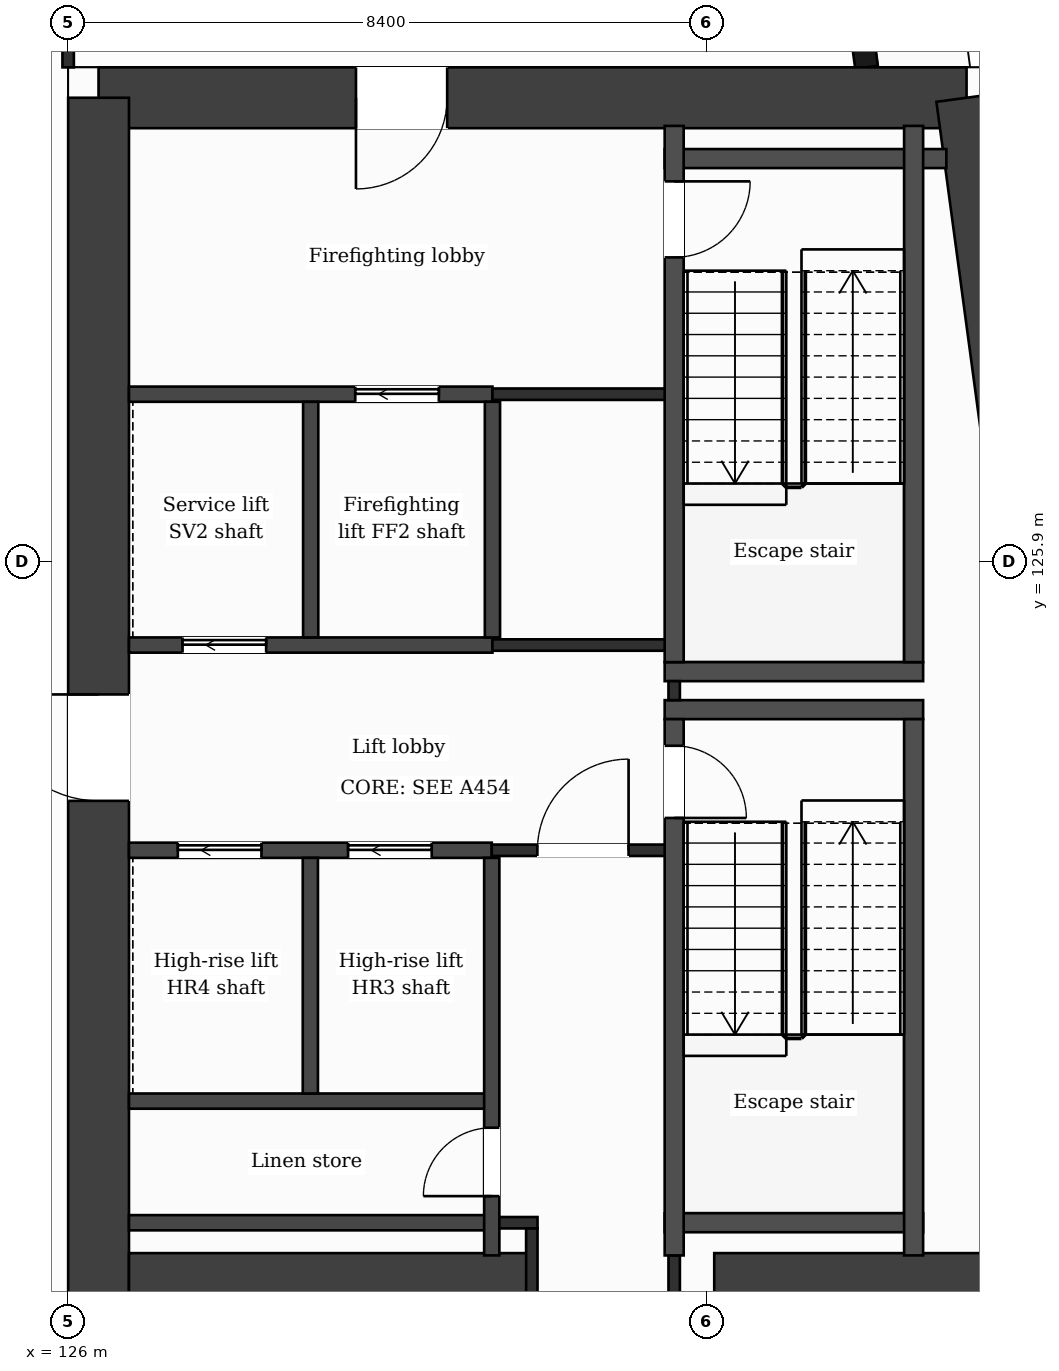
"""IFC4 building model, lengths in metres.
Left out: names, types, materials, properties, quantities, classifications, styles, units other than length and angle.
Written with IfcOpenShell. Run it as: python <this file> out.ifc"""

import sys

from ifc_helpers import new_model, si_unit, direction, frame, frame_2d, origin, place, context, subcontext, project, spatial, rectangle, extrude, element, fill, save


model = new_model("IFC4")
c1 = context("Model", 3, precision=1e-05, world=origin(), true_north=direction((0.0, 1.0)))
c2 = subcontext(c1, "Body", "Model", "MODEL_VIEW")
j1 = project(units=[si_unit("LENGTHUNIT", "METRE"), si_unit("PLANEANGLEUNIT", "RADIAN")], contexts=[c1])
p1 = place(None, origin())
s1 = spatial("IfcSite", under=j1, at=p1, CompositionType="ELEMENT")
p2 = place(p1, origin())
s2 = spatial("IfcBuilding", under=s1, at=p2, CompositionType="ELEMENT")
p3 = place(p2, frame((0.0, 0.0, 220.7)))
s3 = spatial("IfcBuildingStorey", under=s2, at=p3, CompositionType="ELEMENT", Elevation=220.7)
p4 = place(p3, frame((126.4, 132.0, 0.0), z_axis=(0.0, 0.0, 1.0), x_axis=(1.0, 0.0, 0.0)))
e1 = element("IfcWall", 1, at=p4, inside=s3, PredefinedType="SHEAR", context=c2, shape_type="SweptSolid", body=[
    extrude(rectangle(XDim=11.42, YDim=0.8, at=frame_2d((5.71, 0.0))), origin(), (0.0, 0.0, 1.0), 3.7),
])
p5 = place(p4, frame((3.386, 0.0, 0.0)))
e2 = element("IfcOpeningElement", 2, at=p5, cuts=e1, PredefinedType="OPENING", context=c2, shape_type="SweptSolid", body=[
    extrude(rectangle(XDim=1.2, YDim=2.1, at=frame_2d((0.6, 1.05))), frame((0.0, 0.41, 0.0), z_axis=(0.0, -1.0, 0.0), x_axis=(1.0, 0.0, 0.0)), (0.0, 0.0, 1.0), 0.82),
])
p6 = place(p3, frame((137.82, 132.0, 0.0), z_axis=(0.0, 0.0, 1.0), x_axis=(0.133408347329, -0.991061154956, 0.0)))
e3 = element("IfcWall", 3, at=p6, inside=s3, PredefinedType="SHEAR", context=c2, shape_type="SweptSolid", body=[
    extrude(rectangle(XDim=21.391, YDim=0.8, at=frame_2d((10.696, 0.0))), origin(), (0.0, 0.0, 1.0), 3.7),
])
p7 = place(p3, frame((126.4, 110.8, 0.0), z_axis=(0.0, 0.0, 1.0), x_axis=(0.0, 1.0, 0.0)))
e4 = element("IfcWall", 4, at=p7, inside=s3, PredefinedType="SHEAR", context=c2, shape_type="SweptSolid", body=[
    extrude(rectangle(XDim=21.2, YDim=0.8, at=frame_2d((10.6, 0.0))), origin(), (0.0, 0.0, 1.0), 3.7),
])
p8 = place(p7, frame((11.95, 0.0, 0.0)))
e5 = element("IfcOpeningElement", 5, at=p8, cuts=e4, PredefinedType="OPENING", context=c2, shape_type="SweptSolid", body=[
    extrude(rectangle(XDim=1.4, YDim=2.1, at=frame_2d((0.7, 1.05))), frame((0.0, 0.41, 0.0), z_axis=(0.0, -1.0, 0.0), x_axis=(1.0, 0.0, 0.0)), (0.0, 0.0, 1.0), 0.82),
])
p9 = place(p3, frame((126.8, 116.4, 0.0), z_axis=(0.0, 0.0, 1.0), x_axis=(1.0, 0.0, 0.0)))
e6 = element("IfcWall", 6, at=p9, inside=s3, PredefinedType="SHEAR", context=c2, shape_type="SweptSolid", body=[
    extrude(rectangle(XDim=5.3, YDim=0.8, at=frame_2d((2.65, 0.0))), origin(), (0.0, 0.0, 1.0), 3.7),
])
p10 = place(p3, frame((134.5, 116.4, 0.0), z_axis=(0.0, 0.0, 1.0), x_axis=(1.0, 0.0, 0.0)))
e7 = element("IfcWall", 7, at=p10, inside=s3, PredefinedType="SHEAR", context=c2, shape_type="SweptSolid", body=[
    extrude(rectangle(XDim=5.077, YDim=0.8, at=frame_2d((2.539, 0.0))), origin(), (0.0, 0.0, 1.0), 3.7),
])
p11 = place(p3, frame((136.504, 132.4, 0.0), z_axis=(0.0, 0.0, 1.0), x_axis=(-0.133399697462, 0.99106231929, 0.0)))
e8 = element("IfcWall", 8, at=p11, inside=s3, PredefinedType="SOLIDWALL", context=c2, shape_type="SweptSolid", body=[
    extrude(rectangle(XDim=6.74, YDim=0.3, at=frame_2d((3.37, 0.0))), origin(), (0.0, 0.0, 1.0), 3.38),
])
p12 = place(p11, frame((1.115, 0.0, 0.0)))
e9 = element("IfcOpeningElement", 9, at=p12, cuts=e8, PredefinedType="OPENING", context=c2, shape_type="SweptSolid", body=[
    extrude(rectangle(XDim=1.2, YDim=2.4, at=frame_2d((0.6, 1.2))), frame((0.0, 0.16, 0.0), z_axis=(0.0, -1.0, 0.0), x_axis=(1.0, 0.0, 0.0)), (0.0, 0.0, 1.0), 0.32),
])
p13 = place(p11, frame((4.436, 0.0, 0.9)))
e10 = element("IfcOpeningElement", 10, at=p13, cuts=e8, PredefinedType="OPENING", context=c2, shape_type="SweptSolid", body=[
    extrude(rectangle(XDim=1.2, YDim=2.1, at=frame_2d((0.6, 1.05))), frame((0.0, 0.16, 0.0), z_axis=(0.0, -1.0, 0.0), x_axis=(1.0, 0.0, 0.0)), (0.0, 0.0, 1.0), 0.32),
])
p14 = place(p3, frame((126.8, 117.2, 0.0), z_axis=(0.0, 0.0, 1.0), x_axis=(1.0, 0.0, 0.0)))
e11 = element("IfcWall", 11, at=p14, inside=s3, PredefinedType="PARTITIONING", context=c2, shape_type="SweptSolid", body=[
    extrude(rectangle(XDim=4.773, YDim=0.2, at=frame_2d((2.386, 0.0))), origin(), (0.0, 0.0, 1.0), 3.38),
])
p15 = place(p3, frame((131.573, 117.2, 0.0), z_axis=(0.0, 0.0, 1.0), x_axis=(1.0, 0.0, 0.0)))
e12 = element("IfcWall", 12, at=p15, inside=s3, PredefinedType="PARTITIONING", context=c2, shape_type="SweptSolid", body=[
    extrude(rectangle(XDim=0.602, YDim=0.15, at=frame_2d((0.301, 0.0))), origin(), (0.0, 0.0, 1.0), 3.38),
])
p16 = place(p3, frame((133.848, 117.2, 0.0), z_axis=(0.0, 0.0, 1.0), x_axis=(1.0, 0.0, 0.0)))
e13 = element("IfcWall", 13, at=p16, inside=s3, PredefinedType="PARTITIONING", context=c2, shape_type="SweptSolid", body=[
    extrude(rectangle(XDim=3.4, YDim=0.25, at=frame_2d((1.7, 0.0))), origin(), (0.0, 0.0, 1.0), 3.38),
])
p17 = place(p3, frame((126.8, 118.8, 0.0), z_axis=(0.0, 0.0, 1.0), x_axis=(1.0, 0.0, 0.0)))
e14 = element("IfcWall", 14, at=p17, inside=s3, PredefinedType="PARTITIONING", context=c2, shape_type="SweptSolid", body=[
    extrude(rectangle(XDim=4.773, YDim=0.2, at=frame_2d((2.386, 0.0))), origin(), (0.0, 0.0, 1.0), 3.38),
])
p18 = place(p3, frame((126.8, 122.1, 0.0), z_axis=(0.0, 0.0, 1.0), x_axis=(1.0, 0.0, 0.0)))
e15 = element("IfcWall", 15, at=p18, inside=s3, PredefinedType="PARTITIONING", context=c2, shape_type="SweptSolid", body=[
    extrude(rectangle(XDim=4.773, YDim=0.2, at=frame_2d((2.386, 0.0))), origin(), (0.0, 0.0, 1.0), 3.38),
])
p19 = place(p18, frame((2.883, 0.0, 0.0)))
e16 = element("IfcOpeningElement", 16, at=p19, cuts=e15, PredefinedType="OPENING", context=c2, shape_type="SweptSolid", body=[
    extrude(rectangle(XDim=1.1, YDim=2.1, at=frame_2d((0.55, 1.05))), frame((0.0, 0.11, 0.0), z_axis=(0.0, -1.0, 0.0), x_axis=(1.0, 0.0, 0.0)), (0.0, 0.0, 1.0), 0.22),
])
p20 = place(p18, frame((0.643, 0.0, 0.0)))
e17 = element("IfcOpeningElement", 17, at=p20, cuts=e15, PredefinedType="OPENING", context=c2, shape_type="SweptSolid", body=[
    extrude(rectangle(XDim=1.1, YDim=2.1, at=frame_2d((0.55, 1.05))), frame((0.0, 0.11, 0.0), z_axis=(0.0, -1.0, 0.0), x_axis=(1.0, 0.0, 0.0)), (0.0, 0.0, 1.0), 0.22),
])
p21 = place(p3, frame((131.573, 122.1, 0.0), z_axis=(0.0, 0.0, 1.0), x_axis=(1.0, 0.0, 0.0)))
e18 = element("IfcWall", 18, at=p21, inside=s3, PredefinedType="PARTITIONING", context=c2, shape_type="SweptSolid", body=[
    extrude(rectangle(XDim=2.4, YDim=0.15, at=frame_2d((1.2, 0.0))), origin(), (0.0, 0.0, 1.0), 3.38),
])
p22 = place(p21, frame((0.6, 0.0, 0.0)))
e19 = element("IfcOpeningElement", 19, at=p22, cuts=e18, PredefinedType="OPENING", context=c2, shape_type="SweptSolid", body=[
    extrude(rectangle(XDim=1.2, YDim=2.1, at=frame_2d((0.6, 1.05))), frame((0.0, 0.085, 0.0), z_axis=(0.0, -1.0, 0.0), x_axis=(1.0, 0.0, 0.0)), (0.0, 0.0, 1.0), 0.17),
])
for number, where, z_axis, x_axis in (
    (20, (133.848, 123.95, 0.0), (0.0, 0.0, 1.0), (1.0, 0.0, 0.0)),
    (21, (133.848, 124.45, 0.0), (0.0, 0.0, 1.0), (1.0, 0.0, 0.0)),
):
    element("IfcWall", number, at=place(p3, frame(where, z_axis=z_axis, x_axis=x_axis)), inside=s3, PredefinedType="PARTITIONING", context=c2, shape_type="SweptSolid", body=[
        extrude(rectangle(XDim=3.4, YDim=0.25, at=frame_2d((1.7, 0.0))), origin(), (0.0, 0.0, 1.0), 3.38),
    ])
p23 = place(p3, frame((126.8, 124.8, 0.0), z_axis=(0.0, 0.0, 1.0), x_axis=(1.0, 0.0, 0.0)))
e22 = element("IfcWall", 22, at=p23, inside=s3, PredefinedType="PARTITIONING", context=c2, shape_type="SweptSolid", body=[
    extrude(rectangle(XDim=4.782, YDim=0.2, at=frame_2d((2.391, 0.0))), origin(), (0.0, 0.0, 1.0), 3.38),
])
p24 = place(p23, frame((0.705, 0.0, 0.0)))
e23 = element("IfcOpeningElement", 23, at=p24, cuts=e22, PredefinedType="OPENING", context=c2, shape_type="SweptSolid", body=[
    extrude(rectangle(XDim=1.1, YDim=2.1, at=frame_2d((0.55, 1.05))), frame((0.0, 0.11, 0.0), z_axis=(0.0, -1.0, 0.0), x_axis=(1.0, 0.0, 0.0)), (0.0, 0.0, 1.0), 0.22),
])
p25 = place(p3, frame((131.582, 124.8, 0.0), z_axis=(0.0, 0.0, 1.0), x_axis=(1.0, 0.0, 0.0)))
e24 = element("IfcWall", 24, at=p25, inside=s3, PredefinedType="PARTITIONING", context=c2, shape_type="SweptSolid", body=[
    extrude(rectangle(XDim=2.516, YDim=0.15, at=frame_2d((1.258, 0.0))), origin(), (0.0, 0.0, 1.0), 3.38),
])
p26 = place(p3, frame((126.8, 128.1, 0.0), z_axis=(0.0, 0.0, 1.0), x_axis=(1.0, 0.0, 0.0)))
e25 = element("IfcWall", 25, at=p26, inside=s3, PredefinedType="PARTITIONING", context=c2, shape_type="SweptSolid", body=[
    extrude(rectangle(XDim=4.782, YDim=0.2, at=frame_2d((2.391, 0.0))), origin(), (0.0, 0.0, 1.0), 3.38),
])
p27 = place(p26, frame((2.977, 0.0, 0.0)))
e26 = element("IfcOpeningElement", 26, at=p27, cuts=e25, PredefinedType="OPENING", context=c2, shape_type="SweptSolid", body=[
    extrude(rectangle(XDim=1.1, YDim=2.1, at=frame_2d((0.55, 1.05))), frame((0.0, 0.11, 0.0), z_axis=(0.0, -1.0, 0.0), x_axis=(1.0, 0.0, 0.0)), (0.0, 0.0, 1.0), 0.22),
])
p28 = place(p3, frame((131.582, 128.1, 0.0), z_axis=(0.0, 0.0, 1.0), x_axis=(1.0, 0.0, 0.0)))
e27 = element("IfcWall", 27, at=p28, inside=s3, PredefinedType="PARTITIONING", context=c2, shape_type="SweptSolid", body=[
    extrude(rectangle(XDim=2.391, YDim=0.15, at=frame_2d((1.195, 0.0))), origin(), (0.0, 0.0, 1.0), 3.38),
])
p29 = place(p3, frame((133.848, 131.2, 0.0), z_axis=(0.0, 0.0, 1.0), x_axis=(1.0, 0.0, 0.0)))
e28 = element("IfcWall", 28, at=p29, inside=s3, PredefinedType="PARTITIONING", context=c2, shape_type="SweptSolid", body=[
    extrude(rectangle(XDim=3.706, YDim=0.25, at=frame_2d((1.853, 0.0))), origin(), (0.0, 0.0, 1.0), 3.38),
])
p30 = place(p3, frame((126.0, 132.4, 0.0), z_axis=(0.0, 0.0, 1.0), x_axis=(0.0, 1.0, 0.0)))
e29 = element("IfcWall", 29, at=p30, inside=s3, PredefinedType="PARTITIONING", context=c2, shape_type="SweptSolid", body=[
    extrude(rectangle(XDim=1.325, YDim=0.15, at=frame_2d((0.663, 0.0))), origin(), (0.0, 0.0, 1.0), 3.38),
])
for number, where, z_axis, x_axis in (
    (30, (129.187, 118.9, 0.0), (0.0, 0.0, 1.0), (0.0, 1.0, 0.0)),
    (31, (129.191, 124.9, 0.0), (0.0, 0.0, 1.0), (0.0, 1.0, 0.0)),
):
    element("IfcWall", number, at=place(p3, frame(where, z_axis=z_axis, x_axis=x_axis)), inside=s3, PredefinedType="PARTITIONING", context=c2, shape_type="SweptSolid", body=[
        extrude(rectangle(XDim=3.1, YDim=0.2, at=frame_2d((1.55, 0.0))), origin(), (0.0, 0.0, 1.0), 3.38),
    ])
p31 = place(p3, frame((131.573, 116.77, 0.0), z_axis=(0.0, 0.0, 1.0), x_axis=(0.0, 1.0, 0.0)))
e32 = element("IfcWall", 32, at=p31, inside=s3, PredefinedType="PARTITIONING", context=c2, shape_type="SweptSolid", body=[
    extrude(rectangle(XDim=5.23, YDim=0.2, at=frame_2d((2.615, 0.0))), origin(), (0.0, 0.0, 1.0), 3.38),
])
p32 = place(p31, frame((0.78, 0.0, 0.0)))
e33 = element("IfcOpeningElement", 33, at=p32, cuts=e32, PredefinedType="OPENING", context=c2, shape_type="SweptSolid", body=[
    extrude(rectangle(XDim=0.9, YDim=2.1, at=frame_2d((0.45, 1.05))), frame((0.0, 0.11, 0.0), z_axis=(0.0, -1.0, 0.0), x_axis=(1.0, 0.0, 0.0)), (0.0, 0.0, 1.0), 0.22),
])
p33 = place(p3, frame((131.582, 124.9, 0.0), z_axis=(0.0, 0.0, 1.0), x_axis=(0.0, 1.0, 0.0)))
e34 = element("IfcWall", 34, at=p33, inside=s3, PredefinedType="PARTITIONING", context=c2, shape_type="SweptSolid", body=[
    extrude(rectangle(XDim=3.1, YDim=0.2, at=frame_2d((1.55, 0.0))), origin(), (0.0, 0.0, 1.0), 3.38),
])
p34 = place(p3, frame((132.1, 116.0, 0.0), z_axis=(0.0, 0.0, 1.0), x_axis=(0.0, 1.0, 0.0)))
e35 = element("IfcWall", 35, at=p34, inside=s3, PredefinedType="PARTITIONING", context=c2, shape_type="SweptSolid", body=[
    extrude(rectangle(XDim=1.125, YDim=0.15, at=frame_2d((0.562, 0.0))), origin(), (0.0, 0.0, 1.0), 3.38),
])
p35 = place(p3, frame((133.973, 116.0, 0.0), z_axis=(0.0, 0.0, 1.0), x_axis=(0.0, 1.0, 0.0)))
e36 = element("IfcWall", 36, at=p35, inside=s3, PredefinedType="PARTITIONING", context=c2, shape_type="SweptSolid", body=[
    extrude(rectangle(XDim=0.77, YDim=0.15, at=frame_2d((0.385, 0.0))), origin(), (0.0, 0.0, 1.0), 3.38),
])
p36 = place(p3, frame((133.973, 124.075, 0.0), z_axis=(0.0, 0.0, 1.0), x_axis=(0.0, 1.0, 0.0)))
e37 = element("IfcWall", 37, at=p36, inside=s3, PredefinedType="PARTITIONING", context=c2, shape_type="SweptSolid", body=[
    extrude(rectangle(XDim=0.25, YDim=0.15, at=frame_2d((0.125, 0.0))), origin(), (0.0, 0.0, 1.0), 3.38),
])
p37 = place(p3, frame((133.973, 116.77, 0.0), z_axis=(0.0, 0.0, 1.0), x_axis=(0.0, 1.0, 0.0)))
e38 = element("IfcWall", 38, at=p37, inside=s3, PredefinedType="PARTITIONING", context=c2, shape_type="SweptSolid", body=[
    extrude(rectangle(XDim=7.055, YDim=0.25, at=frame_2d((3.527, 0.0))), origin(), (0.0, 0.0, 1.0), 3.38),
])
p38 = place(p37, frame((5.755, 0.0, 0.0)))
e39 = element("IfcOpeningElement", 39, at=p38, cuts=e38, PredefinedType="OPENING", context=c2, shape_type="SweptSolid", body=[
    extrude(rectangle(XDim=0.95, YDim=2.1, at=frame_2d((0.475, 1.05))), frame((0.0, 0.135, 0.0), z_axis=(0.0, -1.0, 0.0), x_axis=(1.0, 0.0, 0.0)), (0.0, 0.0, 1.0), 0.27),
])
p39 = place(p3, frame((133.973, 124.575, 0.0), z_axis=(0.0, 0.0, 1.0), x_axis=(0.0, 1.0, 0.0)))
e40 = element("IfcWall", 40, at=p39, inside=s3, PredefinedType="PARTITIONING", context=c2, shape_type="SweptSolid", body=[
    extrude(rectangle(XDim=7.055, YDim=0.25, at=frame_2d((3.527, 0.0))), origin(), (0.0, 0.0, 1.0), 3.38),
])
p40 = place(p39, frame((5.325, 0.0, 0.0)))
e41 = element("IfcOpeningElement", 41, at=p40, cuts=e40, PredefinedType="OPENING", context=c2, shape_type="SweptSolid", body=[
    extrude(rectangle(XDim=1.0, YDim=2.1, at=frame_2d((0.5, 1.05))), frame((0.0, 0.135, 0.0), z_axis=(0.0, -1.0, 0.0), x_axis=(1.0, 0.0, 0.0)), (0.0, 0.0, 1.0), 0.27),
])
for number, where, z_axis, x_axis in (
    (42, (137.123, 116.77, 0.0), (0.0, 0.0, 1.0), (0.0, 1.0, 0.0)),
    (43, (137.123, 124.575, 0.0), (0.0, 0.0, 1.0), (0.0, 1.0, 0.0)),
):
    element("IfcWall", number, at=place(p3, frame(where, z_axis=z_axis, x_axis=x_axis)), inside=s3, PredefinedType="PARTITIONING", context=c2, shape_type="SweptSolid", body=[
        extrude(rectangle(XDim=7.055, YDim=0.25, at=frame_2d((3.527, 0.0))), origin(), (0.0, 0.0, 1.0), 3.38),
    ])
p41 = place(p22, origin())
e44 = element("IfcDoor", 44, at=p41, inside=s3, OperationType="SINGLE_SWING_RIGHT", PredefinedType="DOOR", context=c2, shape_type="SweptSolid", body=[
    extrude(rectangle(XDim=1.2, YDim=2.1, at=frame_2d((0.6, 1.05))), frame((0.0, 0.025, 0.0), z_axis=(0.0, -1.0, 0.0), x_axis=(1.0, 0.0, 0.0)), (0.0, 0.0, 1.0), 0.05),
])
fill(e19, e44)
p42 = place(p19, origin())
e45 = element("IfcDoor", 45, at=p42, inside=s3, OperationType="SLIDING_TO_LEFT", PredefinedType="DOOR", context=c2, shape_type="SweptSolid", body=[
    extrude(rectangle(XDim=1.1, YDim=2.1, at=frame_2d((0.55, 1.05))), frame((0.0, 0.025, 0.0), z_axis=(0.0, -1.0, 0.0), x_axis=(1.0, 0.0, 0.0)), (0.0, 0.0, 1.0), 0.05),
])
fill(e16, e45)
p43 = place(p20, origin())
e46 = element("IfcDoor", 46, at=p43, inside=s3, OperationType="SLIDING_TO_LEFT", PredefinedType="DOOR", context=c2, shape_type="SweptSolid", body=[
    extrude(rectangle(XDim=1.1, YDim=2.1, at=frame_2d((0.55, 1.05))), frame((0.0, 0.025, 0.0), z_axis=(0.0, -1.0, 0.0), x_axis=(1.0, 0.0, 0.0)), (0.0, 0.0, 1.0), 0.05),
])
fill(e17, e46)
p44 = place(p27, origin())
e47 = element("IfcDoor", 47, at=p44, inside=s3, OperationType="SLIDING_TO_LEFT", PredefinedType="DOOR", context=c2, shape_type="SweptSolid", body=[
    extrude(rectangle(XDim=1.1, YDim=2.1, at=frame_2d((0.55, 1.05))), frame((0.0, 0.025, 0.0), z_axis=(0.0, -1.0, 0.0), x_axis=(1.0, 0.0, 0.0)), (0.0, 0.0, 1.0), 0.05),
])
fill(e26, e47)
p45 = place(p24, origin())
e48 = element("IfcDoor", 48, at=p45, inside=s3, OperationType="SLIDING_TO_LEFT", PredefinedType="DOOR", context=c2, shape_type="SweptSolid", body=[
    extrude(rectangle(XDim=1.1, YDim=2.1, at=frame_2d((0.55, 1.05))), frame((0.0, 0.025, 0.0), z_axis=(0.0, -1.0, 0.0), x_axis=(1.0, 0.0, 0.0)), (0.0, 0.0, 1.0), 0.05),
])
fill(e23, e48)
p46 = place(p38, origin())
e49 = element("IfcDoor", 49, at=p46, inside=s3, OperationType="SINGLE_SWING_LEFT", PredefinedType="DOOR", context=c2, shape_type="SweptSolid", body=[
    extrude(rectangle(XDim=0.95, YDim=2.1, at=frame_2d((0.475, 1.05))), frame((0.0, 0.025, 0.0), z_axis=(0.0, -1.0, 0.0), x_axis=(1.0, 0.0, 0.0)), (0.0, 0.0, 1.0), 0.05),
])
fill(e39, e49)
p47 = place(p40, origin())
e50 = element("IfcDoor", 50, at=p47, inside=s3, OperationType="SINGLE_SWING_RIGHT", PredefinedType="DOOR", context=c2, shape_type="SweptSolid", body=[
    extrude(rectangle(XDim=1.0, YDim=2.1, at=frame_2d((0.5, 1.05))), frame((0.0, 0.025, 0.0), z_axis=(0.0, -1.0, 0.0), x_axis=(1.0, 0.0, 0.0)), (0.0, 0.0, 1.0), 0.05),
])
fill(e41, e50)
p48 = place(p32, origin())
e51 = element("IfcDoor", 51, at=p48, inside=s3, OperationType="SINGLE_SWING_LEFT", PredefinedType="DOOR", context=c2, shape_type="SweptSolid", body=[
    extrude(rectangle(XDim=0.9, YDim=2.1, at=frame_2d((0.45, 1.05))), frame((0.0, 0.025, 0.0), z_axis=(0.0, -1.0, 0.0), x_axis=(1.0, 0.0, 0.0)), (0.0, 0.0, 1.0), 0.05),
])
fill(e33, e51)
p49 = place(p5, origin())
e52 = element("IfcDoor", 52, at=p49, inside=s3, OperationType="SINGLE_SWING_LEFT", PredefinedType="DOOR", context=c2, shape_type="SweptSolid", body=[
    extrude(rectangle(XDim=1.2, YDim=2.1, at=frame_2d((0.6, 1.05))), frame((0.0, 0.025, 0.0), z_axis=(0.0, -1.0, 0.0), x_axis=(1.0, 0.0, 0.0)), (0.0, 0.0, 1.0), 0.05),
])
fill(e2, e52)
p50 = place(p8, origin())
e53 = element("IfcDoor", 53, at=p50, inside=s3, OperationType="SINGLE_SWING_RIGHT", PredefinedType="DOOR", context=c2, shape_type="SweptSolid", body=[
    extrude(rectangle(XDim=1.4, YDim=2.1, at=frame_2d((0.7, 1.05))), frame((0.0, 0.025, 0.0), z_axis=(0.0, -1.0, 0.0), x_axis=(1.0, 0.0, 0.0)), (0.0, 0.0, 1.0), 0.05),
])
fill(e5, e53)
save(model, sys.argv[1])
